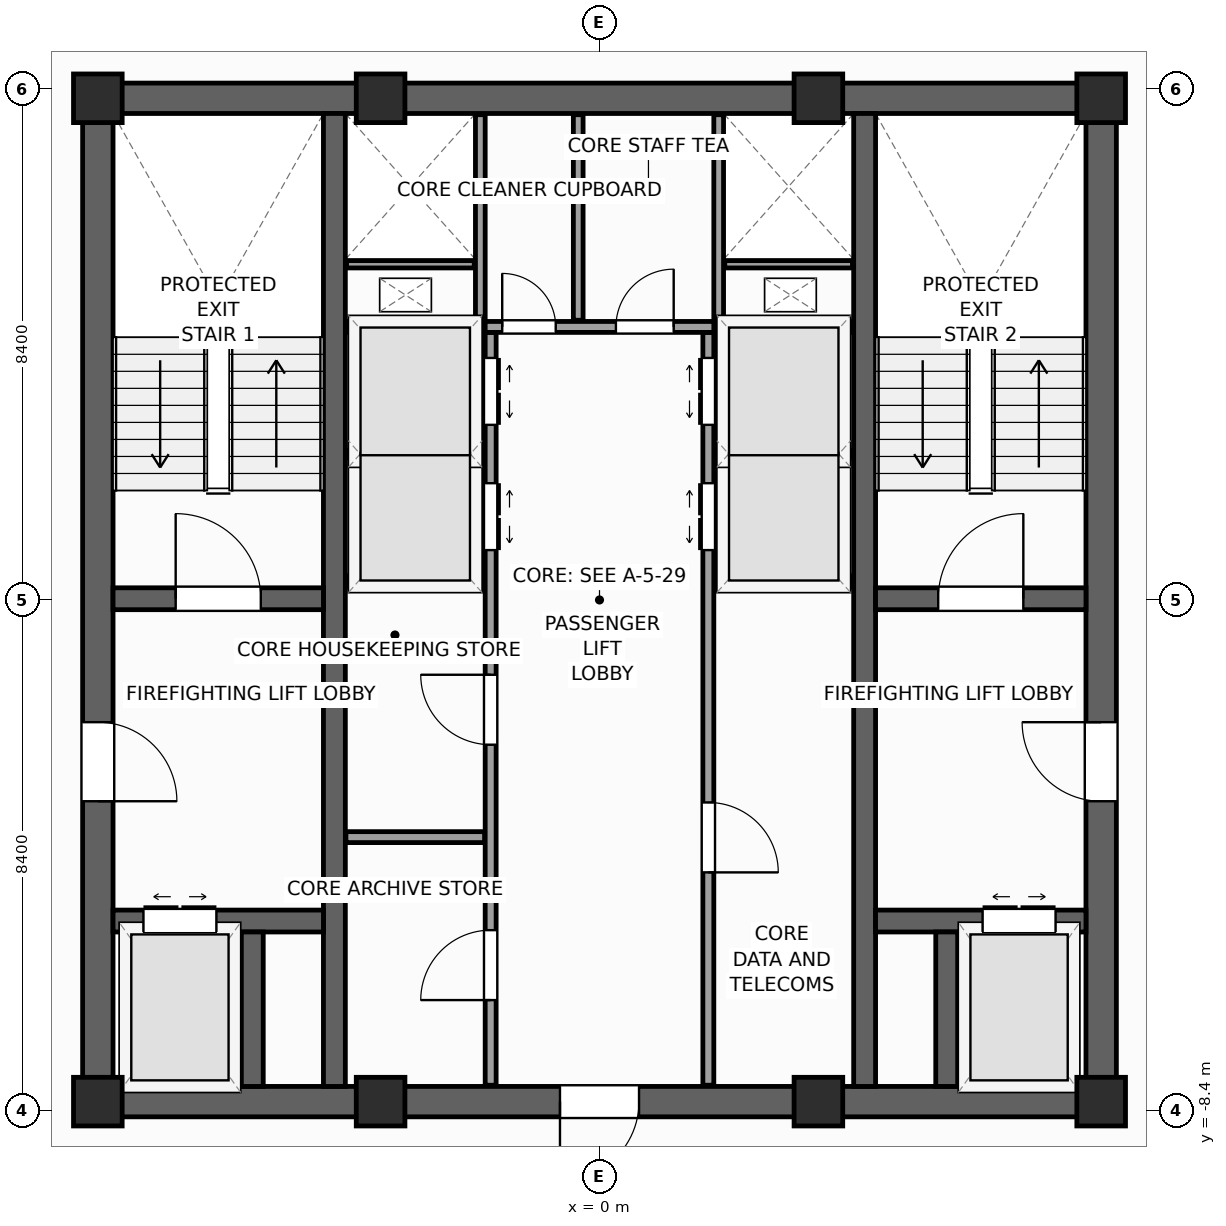
"""IFC4 building model, lengths in metres.
Left out: names, types, materials, properties, quantities, classifications, styles, units other than length and angle.
Written with IfcOpenShell. Run it as: python <this file> out.ifc"""

import sys

from ifc_helpers import new_model, si_unit, direction, frame, frame_2d, origin, origin_2d, place, context, subcontext, project, spatial, rectangle, extrude, source, transform, mapped, element, fill, save


model = new_model("IFC4")
c1 = context("Model", 3, precision=1e-05, world=origin(), true_north=direction((0.0, 1.0)))
c2 = subcontext(c1, "Body", "Model", "MODEL_VIEW")
j1 = project(units=[si_unit("LENGTHUNIT", "METRE"), si_unit("PLANEANGLEUNIT", "RADIAN")], contexts=[c1])
p1 = place(None, origin())
s1 = spatial("IfcSite", under=j1, at=p1, CompositionType="ELEMENT")
p2 = place(p1, origin())
s2 = spatial("IfcBuilding", under=s1, at=p2, CompositionType="ELEMENT")
p3 = place(p2, frame((0.0, 0.0, 294.0)))
s3 = spatial("IfcBuildingStorey", under=s2, at=p3, CompositionType="ELEMENT", Elevation=294.0)
p4 = place(p3, frame((-8.5, -8.25, 0.0), z_axis=(0.0, 0.0, 1.0), x_axis=(1.0, 0.0, 0.0)))
e1 = element("IfcWall", 1, at=p4, inside=s3, PredefinedType="SHEAR", context=c2, shape_type="SweptSolid", body=[
    extrude(rectangle(XDim=17.0, YDim=0.5, at=frame_2d((8.5, 0.0))), origin(), (0.0, 0.0, 1.0), 3.6),
])
p5 = place(p4, frame((7.85, 0.0, 0.0)))
e2 = element("IfcOpeningElement", 2, at=p5, cuts=e1, PredefinedType="OPENING", context=c2, shape_type="SweptSolid", body=[
    extrude(rectangle(XDim=1.3, YDim=2.2, at=frame_2d((0.65, 1.1))), frame((0.0, 0.26, 0.0), z_axis=(0.0, -1.0, 0.0), x_axis=(1.0, 0.0, 0.0)), (0.0, 0.0, 1.0), 0.52),
])
p6 = place(p3, frame((-8.5, 8.25, 0.0), z_axis=(0.0, 0.0, 1.0), x_axis=(1.0, 0.0, 0.0)))
e3 = element("IfcWall", 3, at=p6, inside=s3, PredefinedType="SHEAR", context=c2, shape_type="SweptSolid", body=[
    extrude(rectangle(XDim=17.0, YDim=0.5, at=frame_2d((8.5, 0.0))), origin(), (0.0, 0.0, 1.0), 3.6),
])
p7 = place(p3, frame((-8.25, -8.0, 0.0), z_axis=(0.0, 0.0, 1.0), x_axis=(0.0, 1.0, 0.0)))
e4 = element("IfcWall", 4, at=p7, inside=s3, PredefinedType="SHEAR", context=c2, shape_type="SweptSolid", body=[
    extrude(rectangle(XDim=16.0, YDim=0.5, at=frame_2d((8.0, 0.0))), origin(), (0.0, 0.0, 1.0), 3.6),
])
p8 = place(p7, frame((4.69, 0.0, 0.0)))
e5 = element("IfcOpeningElement", 5, at=p8, cuts=e4, PredefinedType="OPENING", context=c2, shape_type="SweptSolid", body=[
    extrude(rectangle(XDim=1.3, YDim=2.2, at=frame_2d((0.65, 1.1))), frame((0.0, 0.26, 0.0), z_axis=(0.0, -1.0, 0.0), x_axis=(1.0, 0.0, 0.0)), (0.0, 0.0, 1.0), 0.52),
])
p9 = place(p3, frame((8.25, -8.0, 0.0), z_axis=(0.0, 0.0, 1.0), x_axis=(0.0, 1.0, 0.0)))
e6 = element("IfcWall", 6, at=p9, inside=s3, PredefinedType="SHEAR", context=c2, shape_type="SweptSolid", body=[
    extrude(rectangle(XDim=16.0, YDim=0.5, at=frame_2d((8.0, 0.0))), origin(), (0.0, 0.0, 1.0), 3.6),
])
p10 = place(p9, frame((4.69, 0.0, 0.0)))
e7 = element("IfcOpeningElement", 7, at=p10, cuts=e6, PredefinedType="OPENING", context=c2, shape_type="SweptSolid", body=[
    extrude(rectangle(XDim=1.3, YDim=2.2, at=frame_2d((0.65, 1.1))), frame((0.0, 0.26, 0.0), z_axis=(0.0, -1.0, 0.0), x_axis=(1.0, 0.0, 0.0)), (0.0, 0.0, 1.0), 0.52),
])
for number, where, z_axis, x_axis in (
    (8, (-4.36, -8.0, 0.0), (0.0, 0.0, 1.0), (0.0, 1.0, 0.0)),
    (9, (4.36, -8.0, 0.0), (0.0, 0.0, 1.0), (0.0, 1.0, 0.0)),
):
    element("IfcWall", number, at=place(p3, frame(where, z_axis=z_axis, x_axis=x_axis)), inside=s3, PredefinedType="SHEAR", context=c2, shape_type="SweptSolid", body=[
        extrude(rectangle(XDim=16.0, YDim=0.36, at=frame_2d((8.0, 0.0))), origin(), (0.0, 0.0, 1.0), 3.6),
    ])
p11 = place(p3, frame((-8.0, 0.02, 0.0), z_axis=(0.0, 0.0, 1.0), x_axis=(1.0, 0.0, 0.0)))
e10 = element("IfcWall", 10, at=p11, inside=s3, PredefinedType="SHEAR", context=c2, shape_type="SweptSolid", body=[
    extrude(rectangle(XDim=3.46, YDim=0.36, at=frame_2d((1.73, 0.0))), origin(), (0.0, 0.0, 1.0), 3.6),
])
p12 = place(p11, frame((1.03, 0.0, 0.0)))
e11 = element("IfcOpeningElement", 11, at=p12, cuts=e10, PredefinedType="OPENING", context=c2, shape_type="SweptSolid", body=[
    extrude(rectangle(XDim=1.4, YDim=2.2, at=frame_2d((0.7, 1.1))), frame((0.0, 0.19, 0.0), z_axis=(0.0, -1.0, 0.0), x_axis=(1.0, 0.0, 0.0)), (0.0, 0.0, 1.0), 0.38),
])
p13 = place(p3, frame((4.54, 0.02, 0.0), z_axis=(0.0, 0.0, 1.0), x_axis=(1.0, 0.0, 0.0)))
e12 = element("IfcWall", 12, at=p13, inside=s3, PredefinedType="SHEAR", context=c2, shape_type="SweptSolid", body=[
    extrude(rectangle(XDim=3.46, YDim=0.36, at=frame_2d((1.73, 0.0))), origin(), (0.0, 0.0, 1.0), 3.6),
])
p14 = place(p13, frame((1.03, 0.0, 0.0)))
e13 = element("IfcOpeningElement", 13, at=p14, cuts=e12, PredefinedType="OPENING", context=c2, shape_type="SweptSolid", body=[
    extrude(rectangle(XDim=1.4, YDim=2.2, at=frame_2d((0.7, 1.1))), frame((0.0, 0.19, 0.0), z_axis=(0.0, -1.0, 0.0), x_axis=(1.0, 0.0, 0.0)), (0.0, 0.0, 1.0), 0.38),
])
p15 = place(p3, frame((-8.0, -5.28, 0.0), z_axis=(0.0, 0.0, 1.0), x_axis=(1.0, 0.0, 0.0)))
e14 = element("IfcWall", 14, at=p15, inside=s3, PredefinedType="SHEAR", context=c2, shape_type="SweptSolid", body=[
    extrude(rectangle(XDim=3.46, YDim=0.36, at=frame_2d((1.73, 0.0))), origin(), (0.0, 0.0, 1.0), 3.6),
])
p16 = place(p15, frame((0.5, 0.0, 0.0)))
e15 = element("IfcOpeningElement", 15, at=p16, cuts=e14, PredefinedType="OPENING", context=c2, shape_type="SweptSolid", body=[
    extrude(rectangle(XDim=1.2, YDim=2.25, at=frame_2d((0.6, 1.125))), frame((0.0, 0.19, 0.0), z_axis=(0.0, -1.0, 0.0), x_axis=(1.0, 0.0, 0.0)), (0.0, 0.0, 1.0), 0.38),
])
p17 = place(p3, frame((4.54, -5.28, 0.0), z_axis=(0.0, 0.0, 1.0), x_axis=(1.0, 0.0, 0.0)))
e16 = element("IfcWall", 16, at=p17, inside=s3, PredefinedType="SHEAR", context=c2, shape_type="SweptSolid", body=[
    extrude(rectangle(XDim=3.46, YDim=0.36, at=frame_2d((1.73, 0.0))), origin(), (0.0, 0.0, 1.0), 3.6),
])
p18 = place(p17, frame((1.76, 0.0, 0.0)))
e17 = element("IfcOpeningElement", 17, at=p18, cuts=e16, PredefinedType="OPENING", context=c2, shape_type="SweptSolid", body=[
    extrude(rectangle(XDim=1.2, YDim=2.25, at=frame_2d((0.6, 1.125))), frame((0.0, 0.19, 0.0), z_axis=(0.0, -1.0, 0.0), x_axis=(1.0, 0.0, 0.0)), (0.0, 0.0, 1.0), 0.38),
])
for number, where, z_axis, x_axis in (
    (18, (-5.71, -8.0, 0.0), (0.0, 0.0, 1.0), (0.0, 1.0, 0.0)),
    (19, (5.71, -8.0, 0.0), (0.0, 0.0, 1.0), (0.0, 1.0, 0.0)),
):
    element("IfcWall", number, at=place(p3, frame(where, z_axis=z_axis, x_axis=x_axis)), inside=s3, PredefinedType="SHEAR", context=c2, shape_type="SweptSolid", body=[
        extrude(rectangle(XDim=2.54, YDim=0.36, at=frame_2d((1.27, 0.0))), origin(), (0.0, 0.0, 1.0), 3.6),
    ])
m1 = source(origin(), c2, "Body", "SweptSolid", [
    extrude(rectangle(XDim=0.8, YDim=0.8, at=origin_2d()), origin(), (0.0, 0.0, 1.0), 3.6),
])
for number, where, z_axis, x_axis in (
    (20, (-8.25, -8.25, 0.0), (0.0, 0.0, 1.0), (1.0, 0.0, 0.0)),
    (21, (8.25, -8.25, 0.0), (0.0, 0.0, 1.0), (1.0, 0.0, 0.0)),
    (22, (8.25, 8.25, 0.0), (0.0, 0.0, 1.0), (1.0, 0.0, 0.0)),
    (23, (-8.25, 8.25, 0.0), (0.0, 0.0, 1.0), (1.0, 0.0, 0.0)),
    (24, (-3.6, -8.25, 0.0), (0.0, 0.0, 1.0), (1.0, 0.0, 0.0)),
    (25, (3.6, -8.25, 0.0), (0.0, 0.0, 1.0), (1.0, 0.0, 0.0)),
    (26, (-3.6, 8.25, 0.0), (0.0, 0.0, 1.0), (1.0, 0.0, 0.0)),
    (27, (3.6, 8.25, 0.0), (0.0, 0.0, 1.0), (1.0, 0.0, 0.0)),
):
    element("IfcColumn", number, at=place(p3, frame(where, z_axis=z_axis, x_axis=x_axis)), inside=s3, PredefinedType="PILASTER", context=c2, shape_type="MappedRepresentation", body=[
        mapped(m1, transform((0.0, 0.0, 0.0), scale=1.0)),
    ])
p19 = place(p3, frame((-1.79, -7.98, 0.0), z_axis=(0.0, 0.0, 1.0), x_axis=(0.0, 1.0, 0.0)))
e28 = element("IfcWall", 28, at=p19, inside=s3, PredefinedType="PARTITIONING", context=c2, shape_type="SweptSolid", body=[
    extrude(rectangle(XDim=12.38, YDim=0.18, at=frame_2d((6.19, 0.0))), origin(), (0.0, 0.0, 1.0), 3.35),
])
p20 = place(p19, frame((8.8, 0.0, 0.0)))
e29 = element("IfcOpeningElement", 29, at=p20, cuts=e28, PredefinedType="OPENING", context=c2, shape_type="SweptSolid", body=[
    extrude(rectangle(XDim=1.1, YDim=2.2, at=frame_2d((0.55, 1.1))), frame((0.0, 0.1, 0.0), z_axis=(0.0, -1.0, 0.0), x_axis=(1.0, 0.0, 0.0)), (0.0, 0.0, 1.0), 0.2),
])
p21 = place(p19, frame((10.86, 0.0, 0.0)))
e30 = element("IfcOpeningElement", 30, at=p21, cuts=e28, PredefinedType="OPENING", context=c2, shape_type="SweptSolid", body=[
    extrude(rectangle(XDim=1.1, YDim=2.2, at=frame_2d((0.55, 1.1))), frame((0.0, 0.1, 0.0), z_axis=(0.0, -1.0, 0.0), x_axis=(1.0, 0.0, 0.0)), (0.0, 0.0, 1.0), 0.2),
])
p22 = place(p19, frame((1.4, 0.0, 0.0)))
e31 = element("IfcOpeningElement", 31, at=p22, cuts=e28, PredefinedType="OPENING", context=c2, shape_type="SweptSolid", body=[
    extrude(rectangle(XDim=1.15, YDim=2.25, at=frame_2d((0.575, 1.125))), frame((0.0, 0.1, 0.0), z_axis=(0.0, -1.0, 0.0), x_axis=(1.0, 0.0, 0.0)), (0.0, 0.0, 1.0), 0.2),
])
p23 = place(p19, frame((5.6, 0.0, 0.0)))
e32 = element("IfcOpeningElement", 32, at=p23, cuts=e28, PredefinedType="OPENING", context=c2, shape_type="SweptSolid", body=[
    extrude(rectangle(XDim=1.15, YDim=2.25, at=frame_2d((0.575, 1.125))), frame((0.0, 0.1, 0.0), z_axis=(0.0, -1.0, 0.0), x_axis=(1.0, 0.0, 0.0)), (0.0, 0.0, 1.0), 0.2),
])
p24 = place(p3, frame((1.79, -7.98, 0.0), z_axis=(0.0, 0.0, 1.0), x_axis=(0.0, 1.0, 0.0)))
e33 = element("IfcWall", 33, at=p24, inside=s3, PredefinedType="PARTITIONING", context=c2, shape_type="SweptSolid", body=[
    extrude(rectangle(XDim=12.38, YDim=0.18, at=frame_2d((6.19, 0.0))), origin(), (0.0, 0.0, 1.0), 3.35),
])
p25 = place(p24, frame((8.8, 0.0, 0.0)))
e34 = element("IfcOpeningElement", 34, at=p25, cuts=e33, PredefinedType="OPENING", context=c2, shape_type="SweptSolid", body=[
    extrude(rectangle(XDim=1.1, YDim=2.2, at=frame_2d((0.55, 1.1))), frame((0.0, 0.1, 0.0), z_axis=(0.0, -1.0, 0.0), x_axis=(1.0, 0.0, 0.0)), (0.0, 0.0, 1.0), 0.2),
])
p26 = place(p24, frame((10.86, 0.0, 0.0)))
e35 = element("IfcOpeningElement", 35, at=p26, cuts=e33, PredefinedType="OPENING", context=c2, shape_type="SweptSolid", body=[
    extrude(rectangle(XDim=1.1, YDim=2.2, at=frame_2d((0.55, 1.1))), frame((0.0, 0.1, 0.0), z_axis=(0.0, -1.0, 0.0), x_axis=(1.0, 0.0, 0.0)), (0.0, 0.0, 1.0), 0.2),
])
p27 = place(p24, frame((3.5, 0.0, 0.0)))
e36 = element("IfcOpeningElement", 36, at=p27, cuts=e33, PredefinedType="OPENING", context=c2, shape_type="SweptSolid", body=[
    extrude(rectangle(XDim=1.15, YDim=2.25, at=frame_2d((0.575, 1.125))), frame((0.0, 0.1, 0.0), z_axis=(0.0, -1.0, 0.0), x_axis=(1.0, 0.0, 0.0)), (0.0, 0.0, 1.0), 0.2),
])
p28 = place(p3, frame((-1.88, 4.49, 0.0), z_axis=(0.0, 0.0, 1.0), x_axis=(1.0, 0.0, 0.0)))
e37 = element("IfcWall", 37, at=p28, inside=s3, PredefinedType="PARTITIONING", context=c2, shape_type="SweptSolid", body=[
    extrude(rectangle(XDim=3.76, YDim=0.18, at=frame_2d((1.88, 0.0))), origin(), (0.0, 0.0, 1.0), 3.35),
])
p29 = place(p28, frame((0.28, 0.0, 0.0)))
e38 = element("IfcOpeningElement", 38, at=p29, cuts=e37, PredefinedType="OPENING", context=c2, shape_type="SweptSolid", body=[
    extrude(rectangle(XDim=0.88, YDim=2.1, at=frame_2d((0.44, 1.05))), frame((0.0, 0.1, 0.0), z_axis=(0.0, -1.0, 0.0), x_axis=(1.0, 0.0, 0.0)), (0.0, 0.0, 1.0), 0.2),
])
p30 = place(p28, frame((2.15, 0.0, 0.0)))
e39 = element("IfcOpeningElement", 39, at=p30, cuts=e37, PredefinedType="OPENING", context=c2, shape_type="SweptSolid", body=[
    extrude(rectangle(XDim=0.95, YDim=2.1, at=frame_2d((0.475, 1.05))), frame((0.0, 0.1, 0.0), z_axis=(0.0, -1.0, 0.0), x_axis=(1.0, 0.0, 0.0)), (0.0, 0.0, 1.0), 0.2),
])
for number, where, z_axis, x_axis in (
    (40, (-4.17, -3.9, 0.0), (0.0, 0.0, 1.0), (1.0, 0.0, 0.0)),
    (41, (-4.17, 0.3, 0.0), (0.0, 0.0, 1.0), (1.0, 0.0, 0.0)),
    (42, (1.89, 0.3, 0.0), (0.0, 0.0, 1.0), (1.0, 0.0, 0.0)),
    (43, (-4.17, 4.49, 0.0), (0.0, 0.0, 1.0), (1.0, 0.0, 0.0)),
    (44, (1.89, 4.49, 0.0), (0.0, 0.0, 1.0), (1.0, 0.0, 0.0)),
):
    element("IfcWall", number, at=place(p3, frame(where, z_axis=z_axis, x_axis=x_axis)), inside=s3, PredefinedType="PARTITIONING", context=c2, shape_type="SweptSolid", body=[
        extrude(rectangle(XDim=2.28, YDim=0.18, at=frame_2d((1.14, 0.0))), origin(), (0.0, 0.0, 1.0), 3.35),
    ])
for number, where, z_axis, x_axis in (
    (45, (-4.16, 2.4, 0.0), (0.0, 0.0, 1.0), (1.0, 0.0, 0.0)),
    (46, (1.9, 2.4, 0.0), (0.0, 0.0, 1.0), (1.0, 0.0, 0.0)),
):
    element("IfcWall", number, at=place(p3, frame(where, z_axis=z_axis, x_axis=x_axis)), inside=s3, PredefinedType="PARTITIONING", context=c2, shape_type="SweptSolid", body=[
        extrude(rectangle(XDim=2.26, YDim=0.12, at=frame_2d((1.13, 0.0))), origin(), (0.0, 0.0, 1.0), 3.35),
    ])
for number, where, z_axis, x_axis in (
    (47, (-1.96, 4.58, 0.0), (0.0, 0.0, 1.0), (0.0, 1.0, 0.0)),
    (48, (1.96, 4.58, 0.0), (0.0, 0.0, 1.0), (0.0, 1.0, 0.0)),
):
    element("IfcWall", number, at=place(p3, frame(where, z_axis=z_axis, x_axis=x_axis)), inside=s3, PredefinedType="PARTITIONING", context=c2, shape_type="SweptSolid", body=[
        extrude(rectangle(XDim=3.4, YDim=0.16, at=frame_2d((1.7, 0.0))), origin(), (0.0, 0.0, 1.0), 3.35),
    ])
for number, where, z_axis, x_axis in (
    (49, (-4.16, 5.52, 0.0), (0.0, 0.0, 1.0), (1.0, 0.0, 0.0)),
    (50, (2.06, 5.52, 0.0), (0.0, 0.0, 1.0), (1.0, 0.0, 0.0)),
):
    element("IfcWall", number, at=place(p3, frame(where, z_axis=z_axis, x_axis=x_axis)), inside=s3, PredefinedType="PARTITIONING", context=c2, shape_type="SweptSolid", body=[
        extrude(rectangle(XDim=2.1, YDim=0.12, at=frame_2d((1.05, 0.0))), origin(), (0.0, 0.0, 1.0), 3.35),
    ])
p31 = place(p3, frame((-0.35, 4.6, 0.0), z_axis=(0.0, 0.0, 1.0), x_axis=(0.0, 1.0, 0.0)))
e51 = element("IfcWall", 51, at=p31, inside=s3, PredefinedType="PARTITIONING", context=c2, shape_type="SweptSolid", body=[
    extrude(rectangle(XDim=3.38, YDim=0.16, at=frame_2d((1.69, 0.0))), origin(), (0.0, 0.0, 1.0), 3.35),
])
m2 = source(origin(), c2, "Body", "SweptSolid", [
    extrude(rectangle(XDim=1.4, YDim=2.2, at=frame_2d((0.7, 1.1))), frame((0.0, 0.025, 0.0), z_axis=(0.0, -1.0, 0.0), x_axis=(1.0, 0.0, 0.0)), (0.0, 0.0, 1.0), 0.05),
])
p32 = place(p12, origin())
e52 = element("IfcDoor", 52, at=p32, inside=s3, OperationType="SINGLE_SWING_LEFT", PredefinedType="DOOR", context=c2, shape_type="MappedRepresentation", body=[
    mapped(m2, transform((0.0, 0.0, 0.0), scale=1.0)),
])
fill(e11, e52)
p33 = place(p14, origin())
e53 = element("IfcDoor", 53, at=p33, inside=s3, OperationType="SINGLE_SWING_RIGHT", PredefinedType="DOOR", context=c2, shape_type="MappedRepresentation", body=[
    mapped(m2, transform((0.0, 0.0, 0.0), scale=1.0)),
])
fill(e13, e53)
m3 = source(origin(), c2, "Body", "SweptSolid", [
    extrude(rectangle(XDim=1.3, YDim=2.2, at=frame_2d((0.65, 1.1))), frame((0.0, 0.025, 0.0), z_axis=(0.0, -1.0, 0.0), x_axis=(1.0, 0.0, 0.0)), (0.0, 0.0, 1.0), 0.05),
])
p34 = place(p8, frame((1.3, 0.0, 0.0), z_axis=(0.0, 0.0, 1.0), x_axis=(-1.0, 0.0, 0.0)))
e54 = element("IfcDoor", 54, at=p34, inside=s3, OperationType="SINGLE_SWING_LEFT", PredefinedType="DOOR", context=c2, shape_type="MappedRepresentation", body=[
    mapped(m3, transform((0.0, 0.0, 0.0), scale=1.0)),
])
fill(e5, e54)
p35 = place(p10, origin())
e55 = element("IfcDoor", 55, at=p35, inside=s3, OperationType="SINGLE_SWING_RIGHT", PredefinedType="DOOR", context=c2, shape_type="MappedRepresentation", body=[
    mapped(m3, transform((0.0, 0.0, 0.0), scale=1.0)),
])
fill(e7, e55)
p36 = place(p5, frame((1.3, 0.0, 0.0), z_axis=(0.0, 0.0, 1.0), x_axis=(-1.0, 0.0, 0.0)))
e56 = element("IfcDoor", 56, at=p36, inside=s3, OperationType="SINGLE_SWING_LEFT", PredefinedType="DOOR", context=c2, shape_type="MappedRepresentation", body=[
    mapped(m3, transform((0.0, 0.0, 0.0), scale=1.0)),
])
fill(e2, e56)
m4 = source(origin(), c2, "Body", "SweptSolid", [
    extrude(rectangle(XDim=1.2, YDim=2.25, at=frame_2d((0.6, 1.125))), frame((0.0, 0.025, 0.0), z_axis=(0.0, -1.0, 0.0), x_axis=(1.0, 0.0, 0.0)), (0.0, 0.0, 1.0), 0.05),
])
p37 = place(p16, origin())
e57 = element("IfcDoor", 57, at=p37, inside=s3, OperationType="DOUBLE_DOOR_SLIDING", PredefinedType="DOOR", context=c2, shape_type="MappedRepresentation", body=[
    mapped(m4, transform((0.0, 0.0, 0.0), scale=1.0)),
])
fill(e15, e57)
p38 = place(p18, origin())
e58 = element("IfcDoor", 58, at=p38, inside=s3, OperationType="DOUBLE_DOOR_SLIDING", PredefinedType="DOOR", context=c2, shape_type="MappedRepresentation", body=[
    mapped(m4, transform((0.0, 0.0, 0.0), scale=1.0)),
])
fill(e17, e58)
m5 = source(origin(), c2, "Body", "SweptSolid", [
    extrude(rectangle(XDim=1.1, YDim=2.2, at=frame_2d((0.55, 1.1))), frame((0.0, 0.025, 0.0), z_axis=(0.0, -1.0, 0.0), x_axis=(1.0, 0.0, 0.0)), (0.0, 0.0, 1.0), 0.05),
])
p39 = place(p20, frame((1.1, 0.0, 0.0), z_axis=(0.0, 0.0, 1.0), x_axis=(-1.0, 0.0, 0.0)))
e59 = element("IfcDoor", 59, at=p39, inside=s3, OperationType="DOUBLE_DOOR_SLIDING", PredefinedType="DOOR", context=c2, shape_type="MappedRepresentation", body=[
    mapped(m5, transform((0.0, 0.0, 0.0), scale=1.0)),
])
fill(e29, e59)
p40 = place(p21, frame((1.1, 0.0, 0.0), z_axis=(0.0, 0.0, 1.0), x_axis=(-1.0, 0.0, 0.0)))
e60 = element("IfcDoor", 60, at=p40, inside=s3, OperationType="DOUBLE_DOOR_SLIDING", PredefinedType="DOOR", context=c2, shape_type="MappedRepresentation", body=[
    mapped(m5, transform((0.0, 0.0, 0.0), scale=1.0)),
])
fill(e30, e60)
p41 = place(p25, origin())
e61 = element("IfcDoor", 61, at=p41, inside=s3, OperationType="DOUBLE_DOOR_SLIDING", PredefinedType="DOOR", context=c2, shape_type="MappedRepresentation", body=[
    mapped(m5, transform((0.0, 0.0, 0.0), scale=1.0)),
])
fill(e34, e61)
p42 = place(p26, origin())
e62 = element("IfcDoor", 62, at=p42, inside=s3, OperationType="DOUBLE_DOOR_SLIDING", PredefinedType="DOOR", context=c2, shape_type="MappedRepresentation", body=[
    mapped(m5, transform((0.0, 0.0, 0.0), scale=1.0)),
])
fill(e35, e62)
m6 = source(origin(), c2, "Body", "SweptSolid", [
    extrude(rectangle(XDim=1.15, YDim=2.25, at=frame_2d((0.575, 1.125))), frame((0.0, 0.025, 0.0), z_axis=(0.0, -1.0, 0.0), x_axis=(1.0, 0.0, 0.0)), (0.0, 0.0, 1.0), 0.05),
])
p43 = place(p22, origin())
e63 = element("IfcDoor", 63, at=p43, inside=s3, OperationType="SINGLE_SWING_LEFT", PredefinedType="DOOR", context=c2, shape_type="MappedRepresentation", body=[
    mapped(m6, transform((0.0, 0.0, 0.0), scale=1.0)),
])
fill(e31, e63)
p44 = place(p23, origin())
e64 = element("IfcDoor", 64, at=p44, inside=s3, OperationType="SINGLE_SWING_RIGHT", PredefinedType="DOOR", context=c2, shape_type="MappedRepresentation", body=[
    mapped(m6, transform((0.0, 0.0, 0.0), scale=1.0)),
])
fill(e32, e64)
p45 = place(p27, frame((1.15, 0.0, 0.0), z_axis=(0.0, 0.0, 1.0), x_axis=(-1.0, 0.0, 0.0)))
e65 = element("IfcDoor", 65, at=p45, inside=s3, OperationType="SINGLE_SWING_LEFT", PredefinedType="DOOR", context=c2, shape_type="MappedRepresentation", body=[
    mapped(m6, transform((0.0, 0.0, 0.0), scale=1.0)),
])
fill(e36, e65)
m7 = source(origin(), c2, "Body", "SweptSolid", [
    extrude(rectangle(XDim=0.88, YDim=2.1, at=frame_2d((0.44, 1.05))), frame((0.0, 0.025, 0.0), z_axis=(0.0, -1.0, 0.0), x_axis=(1.0, 0.0, 0.0)), (0.0, 0.0, 1.0), 0.05),
])
p46 = place(p29, origin())
e66 = element("IfcDoor", 66, at=p46, inside=s3, OperationType="SINGLE_SWING_LEFT", PredefinedType="DOOR", context=c2, shape_type="MappedRepresentation", body=[
    mapped(m7, transform((0.0, 0.0, 0.0), scale=1.0)),
])
fill(e38, e66)
m8 = source(origin(), c2, "Body", "SweptSolid", [
    extrude(rectangle(XDim=0.95, YDim=2.1, at=frame_2d((0.475, 1.05))), frame((0.0, 0.025, 0.0), z_axis=(0.0, -1.0, 0.0), x_axis=(1.0, 0.0, 0.0)), (0.0, 0.0, 1.0), 0.05),
])
p47 = place(p30, origin())
e67 = element("IfcDoor", 67, at=p47, inside=s3, OperationType="SINGLE_SWING_RIGHT", PredefinedType="DOOR", context=c2, shape_type="MappedRepresentation", body=[
    mapped(m8, transform((0.0, 0.0, 0.0), scale=1.0)),
])
fill(e39, e67)
save(model, sys.argv[1])
